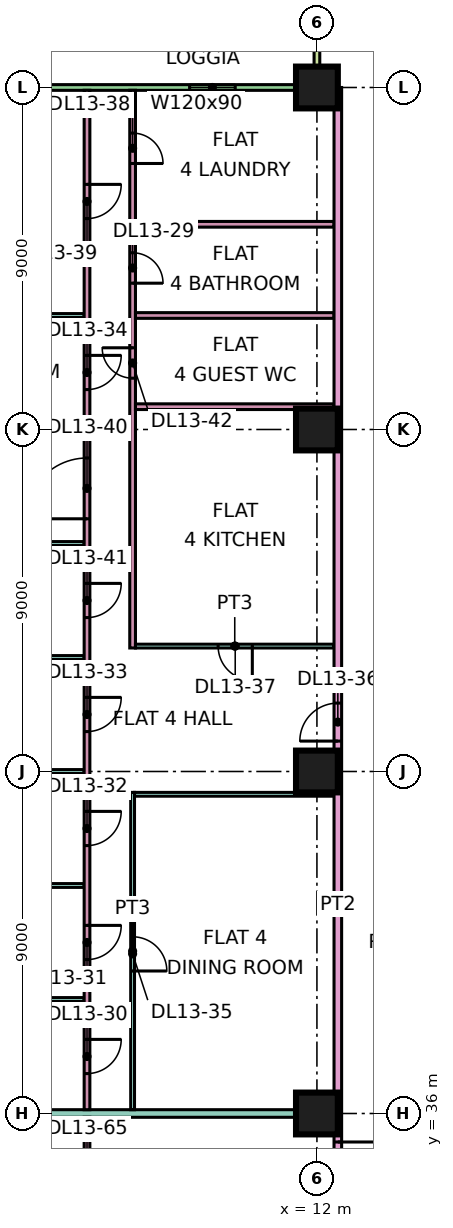
"""IFC4 building model, lengths in metres.
Left out: names, types, materials, properties, quantities, classifications, styles, units other than length and angle.
Written with IfcOpenShell. Run it as: python <this file> out.ifc"""

import sys

from ifc_helpers import new_model, si_unit, direction, frame, frame_2d, origin, origin_2d, place, context, subcontext, project, spatial, rectangle, extrude, element, fill, save


model = new_model("IFC4")
c1 = context("Model", 3, precision=1e-05, world=origin(), true_north=direction((0.0, 1.0)))
c2 = subcontext(c1, "Body", "Model", "MODEL_VIEW")
j1 = project(units=[si_unit("LENGTHUNIT", "METRE"), si_unit("PLANEANGLEUNIT", "RADIAN")], contexts=[c1])
p1 = place(None, origin())
s1 = spatial("IfcSite", under=j1, at=p1, CompositionType="ELEMENT")
p2 = place(p1, origin())
s2 = spatial("IfcBuilding", under=s1, at=p2, CompositionType="ELEMENT")
p3 = place(p2, frame((0.0, 0.0, 63.9)))
s3 = spatial("IfcBuildingStorey", under=s2, at=p3, CompositionType="ELEMENT", Elevation=63.9)
for number, where, z_axis, x_axis in (
    (1, (12.0, 36.0, 0.0), (0.0, 0.0, 1.0), (1.0, 0.0, 0.0)),
    (2, (12.0, 45.0, 0.0), (0.0, 0.0, 1.0), (1.0, 0.0, 0.0)),
    (3, (12.0, 54.0, 0.0), (0.0, 0.0, 1.0), (1.0, 0.0, 0.0)),
    (4, (12.0, 63.0, 0.0), (0.0, 0.0, 1.0), (1.0, 0.0, 0.0)),
):
    element("IfcColumn", number, at=place(p3, frame(where, z_axis=z_axis, x_axis=x_axis)), inside=s3, PredefinedType="COLUMN", context=c2, shape_type="SweptSolid", body=[
        extrude(rectangle(XDim=1.1, YDim=1.1, at=origin_2d()), origin(), (0.0, 0.0, 1.0), 3.75),
    ])
p4 = place(p3, frame((11.925, 63.0, 0.0), z_axis=(0.0, 0.0, 1.0), x_axis=(-1.0, 0.0, 0.0)))
e5 = element("IfcWall", 5, at=p4, inside=s3, PredefinedType="SOLIDWALL", context=c2, shape_type="SweptSolid", body=[
    extrude(rectangle(XDim=10.35, YDim=0.15, at=frame_2d((5.175, 0.0))), origin(), (0.0, 0.0, 1.0), 3.35),
])
p5 = place(p4, frame((2.075, 0.0, 1.7)))
e6 = element("IfcOpeningElement", 6, at=p5, cuts=e5, PredefinedType="OPENING", context=c2, shape_type="SweptSolid", body=[
    extrude(rectangle(XDim=1.2, YDim=0.9, at=frame_2d((0.6, 0.45))), frame((0.0, 0.085, 0.0), z_axis=(0.0, -1.0, 0.0), x_axis=(1.0, 0.0, 0.0)), (0.0, 0.0, 1.0), 0.17),
])
p6 = place(p4, frame((7.262, 0.0, 0.0)))
e7 = element("IfcOpeningElement", 7, at=p6, cuts=e5, PredefinedType="OPENING", context=c2, shape_type="SweptSolid", body=[
    extrude(rectangle(XDim=1.8, YDim=2.4, at=frame_2d((0.9, 1.2))), frame((0.0, 0.085, 0.0), z_axis=(0.0, -1.0, 0.0), x_axis=(1.0, 0.0, 0.0)), (0.0, 0.0, 1.0), 0.17),
])
p7 = place(p3, frame((12.0, 64.5, 0.0), z_axis=(0.0, 0.0, 1.0), x_axis=(0.0, -1.0, 0.0)))
e8 = element("IfcWall", 8, at=p7, inside=s3, PredefinedType="SOLIDWALL", context=c2, shape_type="SweptSolid", body=[
    extrude(rectangle(XDim=1.5, YDim=0.15, at=frame_2d((0.75, 0.0))), origin(), (0.0, 0.0, 1.0), 3.35),
])
for number, where, z_axis, x_axis in (
    (9, (-1.351, 39.0, 0.0), (0.0, 0.0, 1.0), (1.0, 0.0, 0.0)),
    (10, (-1.351, 42.0, 0.0), (0.0, 0.0, 1.0), (1.0, 0.0, 0.0)),
    (11, (-1.351, 45.0, 0.0), (0.0, 0.0, 1.0), (1.0, 0.0, 0.0)),
):
    element("IfcWall", number, at=place(p3, frame(where, z_axis=z_axis, x_axis=x_axis)), inside=s3, PredefinedType="PARTITIONING", context=c2, shape_type="SweptSolid", body=[
        extrude(rectangle(XDim=7.226, YDim=0.1, at=frame_2d((3.613, 0.0))), origin(), (0.0, 0.0, 1.0), 3.35),
    ])
p8 = place(p3, frame((0.0, 36.0, 0.0), z_axis=(0.0, 0.0, 1.0), x_axis=(1.0, 0.0, 0.0)))
e12 = element("IfcWall", 12, at=p8, inside=s3, PredefinedType="PARTITIONING", context=c2, shape_type="SweptSolid", body=[
    extrude(rectangle(XDim=12.45, YDim=0.2, at=frame_2d((6.225, 0.0))), origin(), (0.0, 0.0, 1.0), 3.35),
])
p9 = place(p3, frame((0.0, 48.0, 0.0), z_axis=(0.0, 0.0, 1.0), x_axis=(1.0, 0.0, 0.0)))
e13 = element("IfcWall", 13, at=p9, inside=s3, PredefinedType="PARTITIONING", context=c2, shape_type="SweptSolid", body=[
    extrude(rectangle(XDim=5.875, YDim=0.1, at=frame_2d((2.938, 0.0))), origin(), (0.0, 0.0, 1.0), 3.35),
])
for number, where, z_axis, x_axis in (
    (14, (0.074, 51.0, 0.0), (0.0, 0.0, 1.0), (1.0, 0.0, 0.0)),
    (15, (0.074, 54.0, 0.0), (0.0, 0.0, 1.0), (1.0, 0.0, 0.0)),
    (16, (0.074, 57.0, 0.0), (0.0, 0.0, 1.0), (1.0, 0.0, 0.0)),
):
    element("IfcWall", number, at=place(p3, frame(where, z_axis=z_axis, x_axis=x_axis)), inside=s3, PredefinedType="PARTITIONING", context=c2, shape_type="SweptSolid", body=[
        extrude(rectangle(XDim=5.801, YDim=0.1, at=frame_2d((2.9, 0.0))), origin(), (0.0, 0.0, 1.0), 3.35),
    ])
p10 = place(p3, frame((5.95, 29.925, 0.0), z_axis=(0.0, 0.0, 1.0), x_axis=(0.0, 1.0, 0.0)))
e17 = element("IfcWall", 17, at=p10, inside=s3, PredefinedType="PARTITIONING", context=c2, shape_type="SweptSolid", body=[
    extrude(rectangle(XDim=5.975, YDim=0.15, at=frame_2d((2.987, 0.0))), origin(), (0.0, 0.0, 1.0), 3.35),
])
p11 = place(p10, frame((4.125, 0.0, 0.0)))
e18 = element("IfcOpeningElement", 18, at=p11, cuts=e17, PredefinedType="OPENING", context=c2, shape_type="SweptSolid", body=[
    extrude(rectangle(XDim=0.9, YDim=2.1, at=frame_2d((0.45, 1.05))), frame((0.0, 0.085, 0.0), z_axis=(0.0, -1.0, 0.0), x_axis=(1.0, 0.0, 0.0)), (0.0, 0.0, 1.0), 0.17),
])
p12 = place(p3, frame((5.95, 36.1, 0.0), z_axis=(0.0, 0.0, 1.0), x_axis=(0.0, 1.0, 0.0)))
e19 = element("IfcWall", 19, at=p12, inside=s3, PredefinedType="PARTITIONING", context=c2, shape_type="SweptSolid", body=[
    extrude(rectangle(XDim=26.826, YDim=0.15, at=frame_2d((13.413, 0.0))), origin(), (0.0, 0.0, 1.0), 3.35),
])
p13 = place(p12, frame((0.95, 0.0, 0.0)))
e20 = element("IfcOpeningElement", 20, at=p13, cuts=e19, PredefinedType="OPENING", context=c2, shape_type="SweptSolid", body=[
    extrude(rectangle(XDim=0.9, YDim=2.1, at=frame_2d((0.45, 1.05))), frame((0.0, 0.085, 0.0), z_axis=(0.0, -1.0, 0.0), x_axis=(1.0, 0.0, 0.0)), (0.0, 0.0, 1.0), 0.17),
])
p14 = place(p12, frame((3.95, 0.0, 0.0)))
e21 = element("IfcOpeningElement", 21, at=p14, cuts=e19, PredefinedType="OPENING", context=c2, shape_type="SweptSolid", body=[
    extrude(rectangle(XDim=0.9, YDim=2.1, at=frame_2d((0.45, 1.05))), frame((0.0, 0.085, 0.0), z_axis=(0.0, -1.0, 0.0), x_axis=(1.0, 0.0, 0.0)), (0.0, 0.0, 1.0), 0.17),
])
p15 = place(p12, frame((6.95, 0.0, 0.0)))
e22 = element("IfcOpeningElement", 22, at=p15, cuts=e19, PredefinedType="OPENING", context=c2, shape_type="SweptSolid", body=[
    extrude(rectangle(XDim=0.9, YDim=2.1, at=frame_2d((0.45, 1.05))), frame((0.0, 0.085, 0.0), z_axis=(0.0, -1.0, 0.0), x_axis=(1.0, 0.0, 0.0)), (0.0, 0.0, 1.0), 0.17),
])
p16 = place(p12, frame((9.95, 0.0, 0.0)))
e23 = element("IfcOpeningElement", 23, at=p16, cuts=e19, PredefinedType="OPENING", context=c2, shape_type="SweptSolid", body=[
    extrude(rectangle(XDim=0.9, YDim=2.1, at=frame_2d((0.45, 1.05))), frame((0.0, 0.085, 0.0), z_axis=(0.0, -1.0, 0.0), x_axis=(1.0, 0.0, 0.0)), (0.0, 0.0, 1.0), 0.17),
])
p17 = place(p12, frame((18.95, 0.0, 0.0)))
e24 = element("IfcOpeningElement", 24, at=p17, cuts=e19, PredefinedType="OPENING", context=c2, shape_type="SweptSolid", body=[
    extrude(rectangle(XDim=0.9, YDim=2.1, at=frame_2d((0.45, 1.05))), frame((0.0, 0.085, 0.0), z_axis=(0.0, -1.0, 0.0), x_axis=(1.0, 0.0, 0.0)), (0.0, 0.0, 1.0), 0.17),
])
p18 = place(p12, frame((23.45, 0.0, 0.0)))
e25 = element("IfcOpeningElement", 25, at=p18, cuts=e19, PredefinedType="OPENING", context=c2, shape_type="SweptSolid", body=[
    extrude(rectangle(XDim=0.9, YDim=2.1, at=frame_2d((0.45, 1.05))), frame((0.0, 0.085, 0.0), z_axis=(0.0, -1.0, 0.0), x_axis=(1.0, 0.0, 0.0)), (0.0, 0.0, 1.0), 0.17),
])
p19 = place(p12, frame((15.55, 0.0, 0.0)))
e26 = element("IfcOpeningElement", 26, at=p19, cuts=e19, PredefinedType="OPENING", context=c2, shape_type="SweptSolid", body=[
    extrude(rectangle(XDim=1.6, YDim=2.1, at=frame_2d((0.8, 1.05))), frame((0.0, 0.085, 0.0), z_axis=(0.0, -1.0, 0.0), x_axis=(1.0, 0.0, 0.0)), (0.0, 0.0, 1.0), 0.17),
])
p20 = place(p12, frame((12.95, 0.0, 0.0)))
e27 = element("IfcOpeningElement", 27, at=p20, cuts=e19, PredefinedType="OPENING", context=c2, shape_type="SweptSolid", body=[
    extrude(rectangle(XDim=0.9, YDim=2.1, at=frame_2d((0.45, 1.05))), frame((0.0, 0.085, 0.0), z_axis=(0.0, -1.0, 0.0), x_axis=(1.0, 0.0, 0.0)), (0.0, 0.0, 1.0), 0.17),
])
p21 = place(p3, frame((7.15, 36.1, 0.0), z_axis=(0.0, 0.0, 1.0), x_axis=(0.0, 1.0, 0.0)))
e28 = element("IfcWall", 28, at=p21, inside=s3, PredefinedType="PARTITIONING", context=c2, shape_type="SweptSolid", body=[
    extrude(rectangle(XDim=8.35, YDim=0.1, at=frame_2d((4.175, 0.0))), origin(), (0.0, 0.0, 1.0), 3.35),
])
p22 = place(p21, frame((3.65, 0.0, 0.0)))
e29 = element("IfcOpeningElement", 29, at=p22, cuts=e28, PredefinedType="OPENING", context=c2, shape_type="SweptSolid", body=[
    extrude(rectangle(XDim=0.9, YDim=2.1, at=frame_2d((0.45, 1.05))), frame((0.0, 0.06, 0.0), z_axis=(0.0, -1.0, 0.0), x_axis=(1.0, 0.0, 0.0)), (0.0, 0.0, 1.0), 0.12),
])
p23 = place(p3, frame((7.15, 48.25, 0.0), z_axis=(0.0, 0.0, 1.0), x_axis=(0.0, 1.0, 0.0)))
e30 = element("IfcWall", 30, at=p23, inside=s3, PredefinedType="PARTITIONING", context=c2, shape_type="SweptSolid", body=[
    extrude(rectangle(XDim=14.676, YDim=0.15, at=frame_2d((7.338, 0.0))), origin(), (0.0, 0.0, 1.0), 3.35),
])
p24 = place(p23, frame((9.6, 0.0, 0.0)))
e31 = element("IfcOpeningElement", 31, at=p24, cuts=e30, PredefinedType="OPENING", context=c2, shape_type="SweptSolid", body=[
    extrude(rectangle(XDim=0.8, YDim=2.1, at=frame_2d((0.4, 1.05))), frame((0.0, 0.085, 0.0), z_axis=(0.0, -1.0, 0.0), x_axis=(1.0, 0.0, 0.0)), (0.0, 0.0, 1.0), 0.17),
])
p25 = place(p23, frame((12.75, 0.0, 0.0)))
e32 = element("IfcOpeningElement", 32, at=p25, cuts=e30, PredefinedType="OPENING", context=c2, shape_type="SweptSolid", body=[
    extrude(rectangle(XDim=0.8, YDim=2.1, at=frame_2d((0.4, 1.05))), frame((0.0, 0.085, 0.0), z_axis=(0.0, -1.0, 0.0), x_axis=(1.0, 0.0, 0.0)), (0.0, 0.0, 1.0), 0.17),
])
p26 = place(p23, frame((7.1, 0.0, 0.0)))
e33 = element("IfcOpeningElement", 33, at=p26, cuts=e30, PredefinedType="OPENING", context=c2, shape_type="SweptSolid", body=[
    extrude(rectangle(XDim=0.8, YDim=2.1, at=frame_2d((0.4, 1.05))), frame((0.0, 0.085, 0.0), z_axis=(0.0, -1.0, 0.0), x_axis=(1.0, 0.0, 0.0)), (0.0, 0.0, 1.0), 0.17),
])
p27 = place(p3, frame((7.2, 44.4, 0.0), z_axis=(0.0, 0.0, 1.0), x_axis=(1.0, 0.0, 0.0)))
e34 = element("IfcWall", 34, at=p27, inside=s3, PredefinedType="PARTITIONING", context=c2, shape_type="SweptSolid", body=[
    extrude(rectangle(XDim=5.25, YDim=0.1, at=frame_2d((2.625, 0.0))), origin(), (0.0, 0.0, 1.0), 3.35),
])
p28 = place(p3, frame((7.225, 48.3, 0.0), z_axis=(0.0, 0.0, 1.0), x_axis=(1.0, 0.0, 0.0)))
e35 = element("IfcWall", 35, at=p28, inside=s3, PredefinedType="PARTITIONING", context=c2, shape_type="SweptSolid", body=[
    extrude(rectangle(XDim=5.225, YDim=0.1, at=frame_2d((2.612, 0.0))), origin(), (0.0, 0.0, 1.0), 3.35),
])
p29 = place(p28, frame((2.175, 0.0, 0.0)))
e36 = element("IfcOpeningElement", 36, at=p29, cuts=e35, PredefinedType="OPENING", context=c2, shape_type="SweptSolid", body=[
    extrude(rectangle(XDim=0.9, YDim=2.1, at=frame_2d((0.45, 1.05))), frame((0.0, 0.06, 0.0), z_axis=(0.0, -1.0, 0.0), x_axis=(1.0, 0.0, 0.0)), (0.0, 0.0, 1.0), 0.12),
])
for number, where, z_axis, x_axis in (
    (37, (7.225, 54.6, 0.0), (0.0, 0.0, 1.0), (1.0, 0.0, 0.0)),
    (38, (7.225, 57.0, 0.0), (0.0, 0.0, 1.0), (1.0, 0.0, 0.0)),
    (39, (7.225, 59.4, 0.0), (0.0, 0.0, 1.0), (1.0, 0.0, 0.0)),
):
    element("IfcWall", number, at=place(p3, frame(where, z_axis=z_axis, x_axis=x_axis)), inside=s3, PredefinedType="PARTITIONING", context=c2, shape_type="SweptSolid", body=[
        extrude(rectangle(XDim=5.225, YDim=0.15, at=frame_2d((2.612, 0.0))), origin(), (0.0, 0.0, 1.0), 3.35),
    ])
p30 = place(p3, frame((12.55, 20.0, 0.0), z_axis=(0.0, 0.0, 1.0), x_axis=(0.0, 1.0, 0.0)))
e40 = element("IfcWall", 40, at=p30, inside=s3, PredefinedType="PARTITIONING", context=c2, shape_type="SweptSolid", body=[
    extrude(rectangle(XDim=43.0, YDim=0.2, at=frame_2d((21.5, 0.0))), origin(), (0.0, 0.0, 1.0), 3.35),
])
p31 = place(p30, frame((25.8, 0.0, 0.0)))
e41 = element("IfcOpeningElement", 41, at=p31, cuts=e40, PredefinedType="OPENING", context=c2, shape_type="SweptSolid", body=[
    extrude(rectangle(XDim=1.0, YDim=2.1, at=frame_2d((0.5, 1.05))), frame((0.0, 0.11, 0.0), z_axis=(0.0, -1.0, 0.0), x_axis=(1.0, 0.0, 0.0)), (0.0, 0.0, 1.0), 0.22),
])
p32 = place(p30, frame((0.6, 0.0, 0.0)))
e42 = element("IfcOpeningElement", 42, at=p32, cuts=e40, PredefinedType="OPENING", context=c2, shape_type="SweptSolid", body=[
    extrude(rectangle(XDim=1.2, YDim=2.1, at=frame_2d((0.6, 1.05))), frame((0.0, 0.11, 0.0), z_axis=(0.0, -1.0, 0.0), x_axis=(1.0, 0.0, 0.0)), (0.0, 0.0, 1.0), 0.22),
])
p33 = place(p30, frame((14.25, 0.0, 0.0)))
e43 = element("IfcOpeningElement", 43, at=p33, cuts=e40, PredefinedType="OPENING", context=c2, shape_type="SweptSolid", body=[
    extrude(rectangle(XDim=1.0, YDim=2.1, at=frame_2d((0.5, 1.05))), frame((0.0, 0.11, 0.0), z_axis=(0.0, -1.0, 0.0), x_axis=(1.0, 0.0, 0.0)), (0.0, 0.0, 1.0), 0.22),
])
p34 = place(p5, origin())
e44 = element("IfcWindow", 44, at=p34, inside=s3, PartitioningType="SINGLE_PANEL", PredefinedType="WINDOW", context=c2, shape_type="SweptSolid", body=[
    extrude(rectangle(XDim=1.2, YDim=0.9, at=frame_2d((0.6, 0.45))), frame((0.0, 0.03, 0.0), z_axis=(0.0, -1.0, 0.0), x_axis=(1.0, 0.0, 0.0)), (0.0, 0.0, 1.0), 0.06),
])
fill(e6, e44)
p35 = place(p24, frame((0.8, 0.0, 0.0), z_axis=(0.0, 0.0, 1.0), x_axis=(-1.0, 0.0, 0.0)))
e45 = element("IfcDoor", 45, at=p35, inside=s3, OperationType="SINGLE_SWING_LEFT", PredefinedType="DOOR", context=c2, shape_type="SweptSolid", body=[
    extrude(rectangle(XDim=0.8, YDim=2.1, at=frame_2d((0.4, 1.05))), frame((0.0, 0.025, 0.0), z_axis=(0.0, -1.0, 0.0), x_axis=(1.0, 0.0, 0.0)), (0.0, 0.0, 1.0), 0.05),
])
fill(e31, e45)
p36 = place(p13, origin())
e46 = element("IfcDoor", 46, at=p36, inside=s3, OperationType="SINGLE_SWING_RIGHT", PredefinedType="DOOR", context=c2, shape_type="SweptSolid", body=[
    extrude(rectangle(XDim=0.9, YDim=2.1, at=frame_2d((0.45, 1.05))), frame((0.0, 0.025, 0.0), z_axis=(0.0, -1.0, 0.0), x_axis=(1.0, 0.0, 0.0)), (0.0, 0.0, 1.0), 0.05),
])
fill(e20, e46)
p37 = place(p14, origin())
e47 = element("IfcDoor", 47, at=p37, inside=s3, OperationType="SINGLE_SWING_RIGHT", PredefinedType="DOOR", context=c2, shape_type="SweptSolid", body=[
    extrude(rectangle(XDim=0.9, YDim=2.1, at=frame_2d((0.45, 1.05))), frame((0.0, 0.025, 0.0), z_axis=(0.0, -1.0, 0.0), x_axis=(1.0, 0.0, 0.0)), (0.0, 0.0, 1.0), 0.05),
])
fill(e21, e47)
p38 = place(p15, origin())
e48 = element("IfcDoor", 48, at=p38, inside=s3, OperationType="SINGLE_SWING_RIGHT", PredefinedType="DOOR", context=c2, shape_type="SweptSolid", body=[
    extrude(rectangle(XDim=0.9, YDim=2.1, at=frame_2d((0.45, 1.05))), frame((0.0, 0.025, 0.0), z_axis=(0.0, -1.0, 0.0), x_axis=(1.0, 0.0, 0.0)), (0.0, 0.0, 1.0), 0.05),
])
fill(e22, e48)
p39 = place(p16, origin())
e49 = element("IfcDoor", 49, at=p39, inside=s3, OperationType="SINGLE_SWING_RIGHT", PredefinedType="DOOR", context=c2, shape_type="SweptSolid", body=[
    extrude(rectangle(XDim=0.9, YDim=2.1, at=frame_2d((0.45, 1.05))), frame((0.0, 0.025, 0.0), z_axis=(0.0, -1.0, 0.0), x_axis=(1.0, 0.0, 0.0)), (0.0, 0.0, 1.0), 0.05),
])
fill(e23, e49)
p40 = place(p17, origin())
e50 = element("IfcDoor", 50, at=p40, inside=s3, OperationType="SINGLE_SWING_RIGHT", PredefinedType="DOOR", context=c2, shape_type="SweptSolid", body=[
    extrude(rectangle(XDim=0.9, YDim=2.1, at=frame_2d((0.45, 1.05))), frame((0.0, 0.025, 0.0), z_axis=(0.0, -1.0, 0.0), x_axis=(1.0, 0.0, 0.0)), (0.0, 0.0, 1.0), 0.05),
])
fill(e24, e50)
p41 = place(p22, frame((0.9, 0.0, 0.0), z_axis=(0.0, 0.0, 1.0), x_axis=(-1.0, 0.0, 0.0)))
e51 = element("IfcDoor", 51, at=p41, inside=s3, OperationType="SINGLE_SWING_LEFT", PredefinedType="DOOR", context=c2, shape_type="SweptSolid", body=[
    extrude(rectangle(XDim=0.9, YDim=2.1, at=frame_2d((0.45, 1.05))), frame((0.0, 0.025, 0.0), z_axis=(0.0, -1.0, 0.0), x_axis=(1.0, 0.0, 0.0)), (0.0, 0.0, 1.0), 0.05),
])
fill(e29, e51)
p42 = place(p31, origin())
e52 = element("IfcDoor", 52, at=p42, inside=s3, OperationType="SINGLE_SWING_LEFT", PredefinedType="DOOR", context=c2, shape_type="SweptSolid", body=[
    extrude(rectangle(XDim=1.0, YDim=2.1, at=frame_2d((0.5, 1.05))), frame((0.0, 0.025, 0.0), z_axis=(0.0, -1.0, 0.0), x_axis=(1.0, 0.0, 0.0)), (0.0, 0.0, 1.0), 0.05),
])
fill(e41, e52)
p43 = place(p29, origin())
e53 = element("IfcDoor", 53, at=p43, inside=s3, OperationType="SINGLE_SWING_RIGHT", PredefinedType="DOOR", context=c2, shape_type="SweptSolid", body=[
    extrude(rectangle(XDim=0.9, YDim=2.1, at=frame_2d((0.45, 1.05))), frame((0.0, 0.025, 0.0), z_axis=(0.0, -1.0, 0.0), x_axis=(1.0, 0.0, 0.0)), (0.0, 0.0, 1.0), 0.05),
])
fill(e36, e53)
p44 = place(p25, frame((0.8, 0.0, 0.0), z_axis=(0.0, 0.0, 1.0), x_axis=(-1.0, 0.0, 0.0)))
e54 = element("IfcDoor", 54, at=p44, inside=s3, OperationType="SINGLE_SWING_LEFT", PredefinedType="DOOR", context=c2, shape_type="SweptSolid", body=[
    extrude(rectangle(XDim=0.8, YDim=2.1, at=frame_2d((0.4, 1.05))), frame((0.0, 0.025, 0.0), z_axis=(0.0, -1.0, 0.0), x_axis=(1.0, 0.0, 0.0)), (0.0, 0.0, 1.0), 0.05),
])
fill(e32, e54)
p45 = place(p18, origin())
e55 = element("IfcDoor", 55, at=p45, inside=s3, OperationType="SINGLE_SWING_RIGHT", PredefinedType="DOOR", context=c2, shape_type="SweptSolid", body=[
    extrude(rectangle(XDim=0.9, YDim=2.1, at=frame_2d((0.45, 1.05))), frame((0.0, 0.025, 0.0), z_axis=(0.0, -1.0, 0.0), x_axis=(1.0, 0.0, 0.0)), (0.0, 0.0, 1.0), 0.05),
])
fill(e25, e55)
p46 = place(p19, origin())
e56 = element("IfcDoor", 56, at=p46, inside=s3, OperationType="DOUBLE_DOOR_SINGLE_SWING", PredefinedType="DOOR", context=c2, shape_type="SweptSolid", body=[
    extrude(rectangle(XDim=1.6, YDim=2.1, at=frame_2d((0.8, 1.05))), frame((0.0, 0.025, 0.0), z_axis=(0.0, -1.0, 0.0), x_axis=(1.0, 0.0, 0.0)), (0.0, 0.0, 1.0), 0.05),
])
fill(e26, e56)
p47 = place(p20, origin())
e57 = element("IfcDoor", 57, at=p47, inside=s3, OperationType="SINGLE_SWING_RIGHT", PredefinedType="DOOR", context=c2, shape_type="SweptSolid", body=[
    extrude(rectangle(XDim=0.9, YDim=2.1, at=frame_2d((0.45, 1.05))), frame((0.0, 0.025, 0.0), z_axis=(0.0, -1.0, 0.0), x_axis=(1.0, 0.0, 0.0)), (0.0, 0.0, 1.0), 0.05),
])
fill(e27, e57)
p48 = place(p26, frame((0.8, 0.0, 0.0), z_axis=(0.0, 0.0, 1.0), x_axis=(-1.0, 0.0, 0.0)))
e58 = element("IfcDoor", 58, at=p48, inside=s3, OperationType="SINGLE_SWING_RIGHT", PredefinedType="DOOR", context=c2, shape_type="SweptSolid", body=[
    extrude(rectangle(XDim=0.8, YDim=2.1, at=frame_2d((0.4, 1.05))), frame((0.0, 0.025, 0.0), z_axis=(0.0, -1.0, 0.0), x_axis=(1.0, 0.0, 0.0)), (0.0, 0.0, 1.0), 0.05),
])
fill(e33, e58)
p49 = place(p33, origin())
e59 = element("IfcDoor", 59, at=p49, inside=s3, OperationType="SINGLE_SWING_RIGHT", PredefinedType="DOOR", context=c2, shape_type="SweptSolid", body=[
    extrude(rectangle(XDim=1.0, YDim=2.1, at=frame_2d((0.5, 1.05))), frame((0.0, 0.025, 0.0), z_axis=(0.0, -1.0, 0.0), x_axis=(1.0, 0.0, 0.0)), (0.0, 0.0, 1.0), 0.05),
])
fill(e43, e59)
save(model, sys.argv[1])
